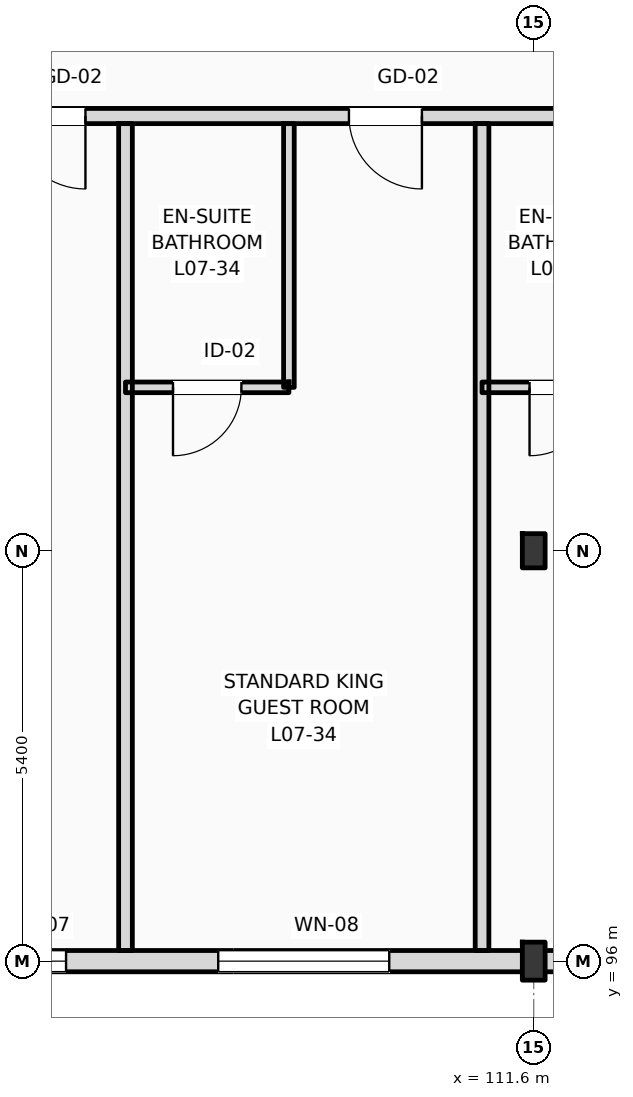
"""IFC4 building model, lengths in metres.
Left out: names, types, materials, properties, quantities, classifications, styles, units other than length and angle.
Written with IfcOpenShell. Run it as: python <this file> out.ifc"""

import sys

from ifc_helpers import new_model, si_unit, direction, frame, frame_2d, origin, origin_2d, place, context, subcontext, project, spatial, rectangle, i_section, extrude, element, fill, save


model = new_model("IFC4")
c1 = context("Model", 3, precision=1e-05, world=origin(), true_north=direction((0.0, 1.0)))
c2 = subcontext(c1, "Body", "Model", "MODEL_VIEW")
j1 = project(units=[si_unit("LENGTHUNIT", "METRE"), si_unit("PLANEANGLEUNIT", "RADIAN")], contexts=[c1])
p1 = place(None, origin())
s1 = spatial("IfcSite", under=j1, at=p1, CompositionType="ELEMENT")
p2 = place(p1, origin())
s2 = spatial("IfcBuilding", under=s1, at=p2, CompositionType="ELEMENT")
p3 = place(p2, frame((0.0, 0.0, 31.8)))
s3 = spatial("IfcBuildingStorey", under=s2, at=p3, CompositionType="ELEMENT", Elevation=31.8)
p4 = place(p3, frame((111.6, 96.0, 0.0), z_axis=(0.0, 0.0, 1.0), x_axis=(1.0, 0.0, 0.0)))
e1 = element("IfcColumn", 1, at=p4, inside=s3, PredefinedType="COLUMN", context=c2, shape_type="SweptSolid", body=[
    extrude(i_section(OverallWidth=0.3, OverallDepth=0.5, WebThickness=0.014, FlangeThickness=0.028, FilletRadius=0.027, at=origin_2d()), origin(), (0.0, 0.0, 1.0), 3.6),
])
p5 = place(p3, frame((111.6, 101.4, 0.0), z_axis=(0.0, 0.0, 1.0), x_axis=(1.0, 0.0, 0.0)))
e2 = element("IfcColumn", 2, at=p5, inside=s3, PredefinedType="COLUMN", context=c2, shape_type="SweptSolid", body=[
    extrude(i_section(OverallWidth=0.3, OverallDepth=0.45, WebThickness=0.014, FlangeThickness=0.026, FilletRadius=0.027, at=origin_2d()), origin(), (0.0, 0.0, 1.0), 3.6),
])
p6 = place(p3, frame((25.2, 96.0, 0.0), z_axis=(0.0, 0.0, 1.0), x_axis=(1.0, 0.0, 0.0)))
e3 = element("IfcWall", 3, at=p6, inside=s3, PredefinedType="STANDARD", context=c2, shape_type="SweptSolid", body=[
    extrude(rectangle(XDim=94.8, YDim=0.28, at=frame_2d((47.4, 0.0))), origin(), (0.0, 0.0, 1.0), 2.72),
])
p7 = place(p6, frame((16.394, 0.0, 0.9)))
e4 = element("IfcOpeningElement", 4, at=p7, cuts=e3, PredefinedType="OPENING", context=c2, shape_type="SweptSolid", body=[
    extrude(rectangle(XDim=2.0, YDim=1.64, at=frame_2d((1.0, 0.82))), frame((0.0, 0.15, 0.0), z_axis=(0.0, -1.0, 0.0), x_axis=(1.0, 0.0, 0.0)), (0.0, 0.0, 1.0), 0.3),
])
p8 = place(p6, frame((20.207, 0.0, 0.9)))
e5 = element("IfcOpeningElement", 5, at=p8, cuts=e3, PredefinedType="OPENING", context=c2, shape_type="SweptSolid", body=[
    extrude(rectangle(XDim=2.3, YDim=1.64, at=frame_2d((1.15, 0.82))), frame((0.0, 0.15, 0.0), z_axis=(0.0, -1.0, 0.0), x_axis=(1.0, 0.0, 0.0)), (0.0, 0.0, 1.0), 0.3),
])
p9 = place(p6, frame((24.287, 0.0, 0.9)))
e6 = element("IfcOpeningElement", 6, at=p9, cuts=e3, PredefinedType="OPENING", context=c2, shape_type="SweptSolid", body=[
    extrude(rectangle(XDim=2.358, YDim=1.64, at=frame_2d((1.179, 0.82))), frame((0.0, 0.15, 0.0), z_axis=(0.0, -1.0, 0.0), x_axis=(1.0, 0.0, 0.0)), (0.0, 0.0, 1.0), 0.3),
])
p10 = place(p6, frame((27.665, 0.0, 0.9)))
e7 = element("IfcOpeningElement", 7, at=p10, cuts=e3, PredefinedType="OPENING", context=c2, shape_type="SweptSolid", body=[
    extrude(rectangle(XDim=1.8, YDim=1.64, at=frame_2d((0.9, 0.82))), frame((0.0, 0.15, 0.0), z_axis=(0.0, -1.0, 0.0), x_axis=(1.0, 0.0, 0.0)), (0.0, 0.0, 1.0), 0.3),
])
p11 = place(p6, frame((32.103, 0.0, 0.9)))
e8 = element("IfcOpeningElement", 8, at=p11, cuts=e3, PredefinedType="OPENING", context=c2, shape_type="SweptSolid", body=[
    extrude(rectangle(XDim=2.359, YDim=1.64, at=frame_2d((1.179, 0.82))), frame((0.0, 0.15, 0.0), z_axis=(0.0, -1.0, 0.0), x_axis=(1.0, 0.0, 0.0)), (0.0, 0.0, 1.0), 0.3),
])
p12 = place(p6, frame((36.336, 0.0, 0.9)))
e9 = element("IfcOpeningElement", 9, at=p12, cuts=e3, PredefinedType="OPENING", context=c2, shape_type="SweptSolid", body=[
    extrude(rectangle(XDim=1.2, YDim=1.64, at=frame_2d((0.6, 0.82))), frame((0.0, 0.15, 0.0), z_axis=(0.0, -1.0, 0.0), x_axis=(1.0, 0.0, 0.0)), (0.0, 0.0, 1.0), 0.3),
])
p13 = place(p6, frame((56.177, 0.0, 0.9)))
e10 = element("IfcOpeningElement", 10, at=p13, cuts=e3, PredefinedType="OPENING", context=c2, shape_type="SweptSolid", body=[
    extrude(rectangle(XDim=1.35, YDim=1.64, at=frame_2d((0.675, 0.82))), frame((0.0, 0.15, 0.0), z_axis=(0.0, -1.0, 0.0), x_axis=(1.0, 0.0, 0.0)), (0.0, 0.0, 1.0), 0.3),
])
p14 = place(p6, frame((60.086, 0.0, 0.9)))
e11 = element("IfcOpeningElement", 11, at=p14, cuts=e3, PredefinedType="OPENING", context=c2, shape_type="SweptSolid", body=[
    extrude(rectangle(XDim=1.5, YDim=1.64, at=frame_2d((0.75, 0.82))), frame((0.0, 0.15, 0.0), z_axis=(0.0, -1.0, 0.0), x_axis=(1.0, 0.0, 0.0)), (0.0, 0.0, 1.0), 0.3),
])
p15 = place(p6, frame((64.838, 0.0, 0.9)))
e12 = element("IfcOpeningElement", 12, at=p15, cuts=e3, PredefinedType="OPENING", context=c2, shape_type="SweptSolid", body=[
    extrude(rectangle(XDim=1.65, YDim=1.64, at=frame_2d((0.825, 0.82))), frame((0.0, 0.15, 0.0), z_axis=(0.0, -1.0, 0.0), x_axis=(1.0, 0.0, 0.0)), (0.0, 0.0, 1.0), 0.3),
])
p16 = place(p6, frame((68.419, 0.0, 0.9)))
e13 = element("IfcOpeningElement", 13, at=p16, cuts=e3, PredefinedType="OPENING", context=c2, shape_type="SweptSolid", body=[
    extrude(rectangle(XDim=0.9, YDim=1.64, at=frame_2d((0.45, 0.82))), frame((0.0, 0.15, 0.0), z_axis=(0.0, -1.0, 0.0), x_axis=(1.0, 0.0, 0.0)), (0.0, 0.0, 1.0), 0.3),
])
p17 = place(p6, frame((73.544, 0.0, 0.9)))
e14 = element("IfcOpeningElement", 14, at=p17, cuts=e3, PredefinedType="OPENING", context=c2, shape_type="SweptSolid", body=[
    extrude(rectangle(XDim=1.95, YDim=1.64, at=frame_2d((0.975, 0.82))), frame((0.0, 0.15, 0.0), z_axis=(0.0, -1.0, 0.0), x_axis=(1.0, 0.0, 0.0)), (0.0, 0.0, 1.0), 0.3),
])
p18 = place(p6, frame((78.897, 0.0, 0.9)))
e15 = element("IfcOpeningElement", 15, at=p18, cuts=e3, PredefinedType="OPENING", context=c2, shape_type="SweptSolid", body=[
    extrude(rectangle(XDim=1.35, YDim=1.64, at=frame_2d((0.675, 0.82))), frame((0.0, 0.15, 0.0), z_axis=(0.0, -1.0, 0.0), x_axis=(1.0, 0.0, 0.0)), (0.0, 0.0, 1.0), 0.3),
])
p19 = place(p6, frame((82.249, 0.0, 0.9)))
e16 = element("IfcOpeningElement", 16, at=p19, cuts=e3, PredefinedType="OPENING", context=c2, shape_type="SweptSolid", body=[
    extrude(rectangle(XDim=2.25, YDim=1.64, at=frame_2d((1.125, 0.82))), frame((0.0, 0.15, 0.0), z_axis=(0.0, -1.0, 0.0), x_axis=(1.0, 0.0, 0.0)), (0.0, 0.0, 1.0), 0.3),
])
p20 = place(p6, frame((87.202, 0.0, 0.9)))
e17 = element("IfcOpeningElement", 17, at=p20, cuts=e3, PredefinedType="OPENING", context=c2, shape_type="SweptSolid", body=[
    extrude(rectangle(XDim=1.8, YDim=1.64, at=frame_2d((0.9, 0.82))), frame((0.0, 0.15, 0.0), z_axis=(0.0, -1.0, 0.0), x_axis=(1.0, 0.0, 0.0)), (0.0, 0.0, 1.0), 0.3),
])
p21 = place(p6, frame((90.867, 0.0, 0.9)))
e18 = element("IfcOpeningElement", 18, at=p21, cuts=e3, PredefinedType="OPENING", context=c2, shape_type="SweptSolid", body=[
    extrude(rectangle(XDim=2.55, YDim=1.64, at=frame_2d((1.275, 0.82))), frame((0.0, 0.15, 0.0), z_axis=(0.0, -1.0, 0.0), x_axis=(1.0, 0.0, 0.0)), (0.0, 0.0, 1.0), 0.3),
])
p22 = place(p3, frame((79.76, 107.12, 0.0), z_axis=(0.0, 0.0, 1.0), x_axis=(1.0, 0.0, 0.0)))
e19 = element("IfcWall", 19, at=p22, inside=s3, PredefinedType="PARTITIONING", context=c2, shape_type="SweptSolid", body=[
    extrude(rectangle(XDim=40.1, YDim=0.2, at=frame_2d((20.05, 0.0))), origin(), (0.0, 0.0, 1.0), 3.36),
])
p23 = place(p22, frame((2.887, 0.0, 0.0)))
e20 = element("IfcOpeningElement", 20, at=p23, cuts=e19, PredefinedType="OPENING", context=c2, shape_type="SweptSolid", body=[
    extrude(rectangle(XDim=0.96, YDim=2.2, at=frame_2d((0.48, 1.1))), frame((0.0, 0.11, 0.0), z_axis=(0.0, -1.0, 0.0), x_axis=(1.0, 0.0, 0.0)), (0.0, 0.0, 1.0), 0.22),
])
p24 = place(p22, frame((5.121, 0.0, 0.0)))
e21 = element("IfcOpeningElement", 21, at=p24, cuts=e19, PredefinedType="OPENING", context=c2, shape_type="SweptSolid", body=[
    extrude(rectangle(XDim=0.96, YDim=2.2, at=frame_2d((0.48, 1.1))), frame((0.0, 0.11, 0.0), z_axis=(0.0, -1.0, 0.0), x_axis=(1.0, 0.0, 0.0)), (0.0, 0.0, 1.0), 0.22),
])
p25 = place(p22, frame((11.698, 0.0, 0.0)))
e22 = element("IfcOpeningElement", 22, at=p25, cuts=e19, PredefinedType="OPENING", context=c2, shape_type="SweptSolid", body=[
    extrude(rectangle(XDim=0.96, YDim=2.2, at=frame_2d((0.48, 1.1))), frame((0.0, 0.11, 0.0), z_axis=(0.0, -1.0, 0.0), x_axis=(1.0, 0.0, 0.0)), (0.0, 0.0, 1.0), 0.22),
])
p26 = place(p22, frame((13.976, 0.0, 0.0)))
e23 = element("IfcOpeningElement", 23, at=p26, cuts=e19, PredefinedType="OPENING", context=c2, shape_type="SweptSolid", body=[
    extrude(rectangle(XDim=0.96, YDim=2.2, at=frame_2d((0.48, 1.1))), frame((0.0, 0.11, 0.0), z_axis=(0.0, -1.0, 0.0), x_axis=(1.0, 0.0, 0.0)), (0.0, 0.0, 1.0), 0.22),
])
p27 = place(p22, frame((20.554, 0.0, 0.0)))
e24 = element("IfcOpeningElement", 24, at=p27, cuts=e19, PredefinedType="OPENING", context=c2, shape_type="SweptSolid", body=[
    extrude(rectangle(XDim=0.96, YDim=2.2, at=frame_2d((0.48, 1.1))), frame((0.0, 0.11, 0.0), z_axis=(0.0, -1.0, 0.0), x_axis=(1.0, 0.0, 0.0)), (0.0, 0.0, 1.0), 0.22),
])
p28 = place(p22, frame((24.982, 0.0, 0.0)))
e25 = element("IfcOpeningElement", 25, at=p28, cuts=e19, PredefinedType="OPENING", context=c2, shape_type="SweptSolid", body=[
    extrude(rectangle(XDim=0.96, YDim=2.2, at=frame_2d((0.48, 1.1))), frame((0.0, 0.11, 0.0), z_axis=(0.0, -1.0, 0.0), x_axis=(1.0, 0.0, 0.0)), (0.0, 0.0, 1.0), 0.22),
])
p29 = place(p22, frame((29.409, 0.0, 0.0)))
e26 = element("IfcOpeningElement", 26, at=p29, cuts=e19, PredefinedType="OPENING", context=c2, shape_type="SweptSolid", body=[
    extrude(rectangle(XDim=0.96, YDim=2.2, at=frame_2d((0.48, 1.1))), frame((0.0, 0.11, 0.0), z_axis=(0.0, -1.0, 0.0), x_axis=(1.0, 0.0, 0.0)), (0.0, 0.0, 1.0), 0.22),
])
p30 = place(p22, frame((33.837, 0.0, 0.0)))
e27 = element("IfcOpeningElement", 27, at=p30, cuts=e19, PredefinedType="OPENING", context=c2, shape_type="SweptSolid", body=[
    extrude(rectangle(XDim=0.96, YDim=2.2, at=frame_2d((0.48, 1.1))), frame((0.0, 0.11, 0.0), z_axis=(0.0, -1.0, 0.0), x_axis=(1.0, 0.0, 0.0)), (0.0, 0.0, 1.0), 0.22),
])
p31 = place(p22, frame((36.027, 0.0, 0.0)))
e28 = element("IfcOpeningElement", 28, at=p31, cuts=e19, PredefinedType="OPENING", context=c2, shape_type="SweptSolid", body=[
    extrude(rectangle(XDim=0.96, YDim=2.2, at=frame_2d((0.48, 1.1))), frame((0.0, 0.11, 0.0), z_axis=(0.0, -1.0, 0.0), x_axis=(1.0, 0.0, 0.0)), (0.0, 0.0, 1.0), 0.22),
])
p32 = place(p3, frame((106.229, 96.14, 0.0), z_axis=(0.0, 0.0, 1.0), x_axis=(0.0, 1.0, 0.0)))
e29 = element("IfcWall", 29, at=p32, inside=s3, PredefinedType="PARTITIONING", context=c2, shape_type="SweptSolid", body=[
    extrude(rectangle(XDim=10.88, YDim=0.18, at=frame_2d((5.44, 0.0))), origin(), (0.0, 0.0, 1.0), 2.97),
])
p33 = place(p3, frame((110.92, 96.14, 0.0), z_axis=(0.0, 0.0, 1.0), x_axis=(0.0, 1.0, 0.0)))
e30 = element("IfcWall", 30, at=p33, inside=s3, PredefinedType="PARTITIONING", context=c2, shape_type="SweptSolid", body=[
    extrude(rectangle(XDim=10.88, YDim=0.18, at=frame_2d((5.44, 0.0))), origin(), (0.0, 0.0, 1.0), 3.36),
])
p34 = place(p3, frame((108.379, 103.55, 0.0), z_axis=(0.0, 0.0, 1.0), x_axis=(0.0, 1.0, 0.0)))
e31 = element("IfcWall", 31, at=p34, inside=s3, PredefinedType="PARTITIONING", context=c2, shape_type="SweptSolid", body=[
    extrude(rectangle(XDim=3.47, YDim=0.14, at=frame_2d((1.735, 0.0))), origin(), (0.0, 0.0, 1.0), 3.36),
])
p35 = place(p3, frame((106.229, 103.55, 0.0), z_axis=(0.0, 0.0, 1.0), x_axis=(1.0, 0.0, 0.0)))
e32 = element("IfcWall", 32, at=p35, inside=s3, PredefinedType="PARTITIONING", context=c2, shape_type="SweptSolid", body=[
    extrude(rectangle(XDim=2.15, YDim=0.14, at=frame_2d((1.075, 0.0))), origin(), (0.0, 0.0, 1.0), 3.36),
])
p36 = place(p35, frame((0.625, 0.0, 0.0)))
e33 = element("IfcOpeningElement", 33, at=p36, cuts=e32, PredefinedType="OPENING", context=c2, shape_type="SweptSolid", body=[
    extrude(rectangle(XDim=0.9, YDim=2.1, at=frame_2d((0.45, 1.05))), frame((0.0, 0.08, 0.0), z_axis=(0.0, -1.0, 0.0), x_axis=(1.0, 0.0, 0.0)), (0.0, 0.0, 1.0), 0.16),
])
p37 = place(p3, frame((110.92, 103.55, 0.0), z_axis=(0.0, 0.0, 1.0), x_axis=(1.0, 0.0, 0.0)))
e34 = element("IfcWall", 34, at=p37, inside=s3, PredefinedType="PARTITIONING", context=c2, shape_type="SweptSolid", body=[
    extrude(rectangle(XDim=2.15, YDim=0.14, at=frame_2d((1.075, 0.0))), origin(), (0.0, 0.0, 1.0), 3.36),
])
p38 = place(p37, frame((0.625, 0.0, 0.0)))
e35 = element("IfcOpeningElement", 35, at=p38, cuts=e34, PredefinedType="OPENING", context=c2, shape_type="SweptSolid", body=[
    extrude(rectangle(XDim=0.9, YDim=2.1, at=frame_2d((0.45, 1.05))), frame((0.0, 0.08, 0.0), z_axis=(0.0, -1.0, 0.0), x_axis=(1.0, 0.0, 0.0)), (0.0, 0.0, 1.0), 0.16),
])
p39 = place(p18, origin())
e36 = element("IfcWindow", 36, at=p39, inside=s3, PartitioningType="DOUBLE_PANEL_VERTICAL", PredefinedType="WINDOW", context=c2, shape_type="SweptSolid", body=[
    extrude(rectangle(XDim=1.35, YDim=1.64, at=frame_2d((0.675, 0.82))), frame((0.0, 0.03, 0.0), z_axis=(0.0, -1.0, 0.0), x_axis=(1.0, 0.0, 0.0)), (0.0, 0.0, 1.0), 0.06),
])
fill(e15, e36)
p40 = place(p19, origin())
e37 = element("IfcWindow", 37, at=p40, inside=s3, PartitioningType="DOUBLE_PANEL_VERTICAL", PredefinedType="WINDOW", context=c2, shape_type="SweptSolid", body=[
    extrude(rectangle(XDim=2.25, YDim=1.64, at=frame_2d((1.125, 0.82))), frame((0.0, 0.03, 0.0), z_axis=(0.0, -1.0, 0.0), x_axis=(1.0, 0.0, 0.0)), (0.0, 0.0, 1.0), 0.06),
])
fill(e16, e37)
p41 = place(p28, frame((0.96, 0.0, 0.0), z_axis=(0.0, 0.0, 1.0), x_axis=(-1.0, 0.0, 0.0)))
e38 = element("IfcDoor", 38, at=p41, inside=s3, OperationType="SINGLE_SWING_RIGHT", PredefinedType="DOOR", context=c2, shape_type="SweptSolid", body=[
    extrude(rectangle(XDim=0.96, YDim=2.2, at=frame_2d((0.48, 1.1))), frame((0.0, 0.025, 0.0), z_axis=(0.0, -1.0, 0.0), x_axis=(1.0, 0.0, 0.0)), (0.0, 0.0, 1.0), 0.05),
])
fill(e25, e38)
p42 = place(p29, frame((0.96, 0.0, 0.0), z_axis=(0.0, 0.0, 1.0), x_axis=(-1.0, 0.0, 0.0)))
e39 = element("IfcDoor", 39, at=p42, inside=s3, OperationType="SINGLE_SWING_RIGHT", PredefinedType="DOOR", context=c2, shape_type="SweptSolid", body=[
    extrude(rectangle(XDim=0.96, YDim=2.2, at=frame_2d((0.48, 1.1))), frame((0.0, 0.025, 0.0), z_axis=(0.0, -1.0, 0.0), x_axis=(1.0, 0.0, 0.0)), (0.0, 0.0, 1.0), 0.05),
])
fill(e26, e39)
p43 = place(p36, frame((0.9, 0.0, 0.0), z_axis=(0.0, 0.0, 1.0), x_axis=(-1.0, 0.0, 0.0)))
e40 = element("IfcDoor", 40, at=p43, inside=s3, OperationType="SINGLE_SWING_LEFT", PredefinedType="DOOR", context=c2, shape_type="SweptSolid", body=[
    extrude(rectangle(XDim=0.9, YDim=2.1, at=frame_2d((0.45, 1.05))), frame((0.0, 0.025, 0.0), z_axis=(0.0, -1.0, 0.0), x_axis=(1.0, 0.0, 0.0)), (0.0, 0.0, 1.0), 0.05),
])
fill(e33, e40)
p44 = place(p38, frame((0.9, 0.0, 0.0), z_axis=(0.0, 0.0, 1.0), x_axis=(-1.0, 0.0, 0.0)))
e41 = element("IfcDoor", 41, at=p44, inside=s3, OperationType="SINGLE_SWING_LEFT", PredefinedType="DOOR", context=c2, shape_type="SweptSolid", body=[
    extrude(rectangle(XDim=0.9, YDim=2.1, at=frame_2d((0.45, 1.05))), frame((0.0, 0.025, 0.0), z_axis=(0.0, -1.0, 0.0), x_axis=(1.0, 0.0, 0.0)), (0.0, 0.0, 1.0), 0.05),
])
fill(e35, e41)
save(model, sys.argv[1])
